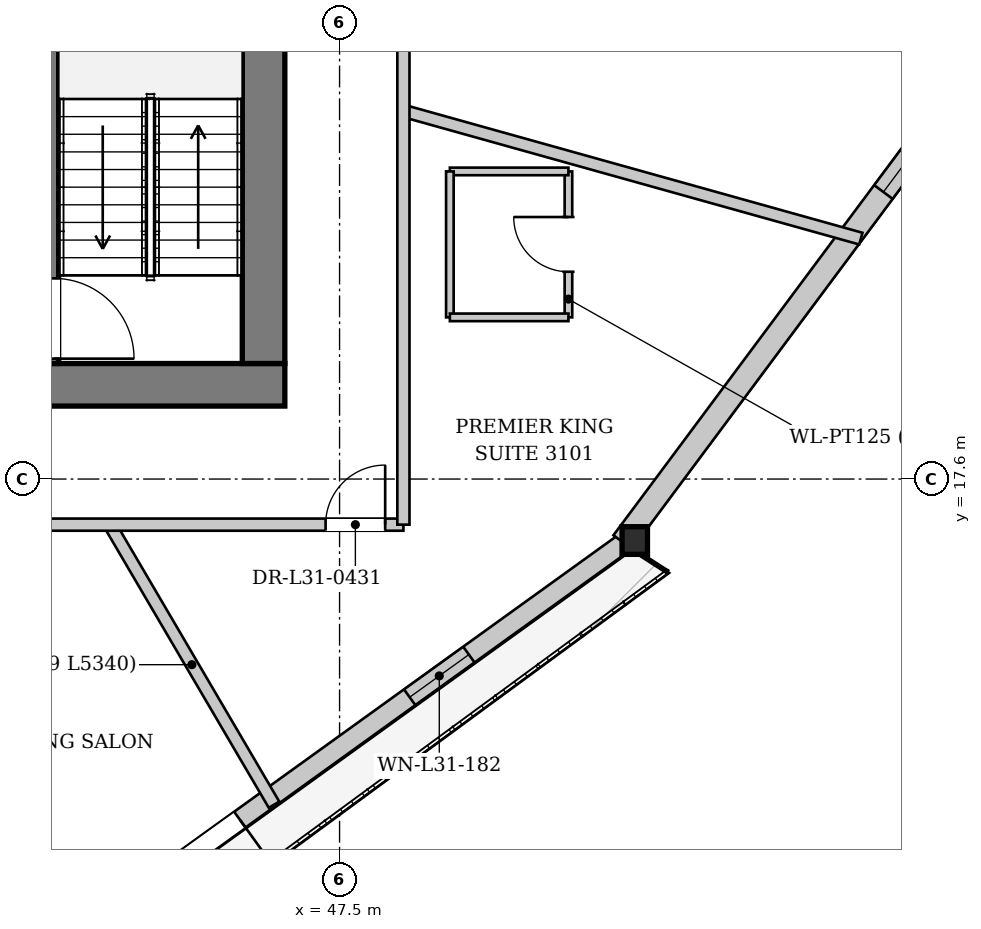
"""IFC4 building model, lengths in metres.
Left out: names, types, materials, properties, quantities, classifications, styles, units other than length and angle.
Written with IfcOpenShell. Run it as: python <this file> out.ifc"""

import sys

from ifc_helpers import new_model, si_unit, direction, frame, frame_2d, origin, origin_2d, place, context, subcontext, project, spatial, rectangle, i_section, extrude, source, transform, mapped, element, fill, save


model = new_model("IFC4")
c1 = context("Model", 3, precision=1e-05, world=origin(), true_north=direction((0.0, 1.0)))
c2 = subcontext(c1, "Body", "Model", "MODEL_VIEW")
j1 = project(units=[si_unit("LENGTHUNIT", "METRE"), si_unit("PLANEANGLEUNIT", "RADIAN")], contexts=[c1])
p1 = place(None, origin())
s1 = spatial("IfcSite", under=j1, at=p1, CompositionType="ELEMENT")
p2 = place(p1, origin())
s2 = spatial("IfcBuilding", under=s1, at=p2, CompositionType="ELEMENT")
p3 = place(p2, frame((0.0, 0.0, 119.9)))
s3 = spatial("IfcBuildingStorey", under=s2, at=p3, CompositionType="ELEMENT", Elevation=119.9)
m1 = source(origin(), c2, "Body", "SweptSolid", [
    extrude(i_section(OverallWidth=0.418, OverallDepth=0.455, WebThickness=0.038, FlangeThickness=0.059, at=origin_2d()), origin(), (0.0, 0.0, 1.0), 3.398),
])
p4 = place(p3, frame((52.309, 16.449, 0.0), z_axis=(0.026872697938, 0.082486249285, 0.996229831306), x_axis=(-0.950814714798, 0.309760194542, 0.0)))
e1 = element("IfcColumn", 1, at=p4, inside=s3, PredefinedType="COLUMN", context=c2, shape_type="MappedRepresentation", body=[
    mapped(m1, transform((0.0, 0.0, 0.0), x_axis=(1.0, 0.0, 0.0), y_axis=(0.0, 1.0, 0.0), z_axis=(0.0, 0.0, 1.0), scale=1.0)),
])
p5 = place(p3, frame((52.216, 16.579, 0.0), z_axis=(0.0, 0.0, 1.0), x_axis=(-0.811343672804, -0.584569452334, 0.0)))
e2 = element("IfcWall", 2, at=p5, inside=s3, PredefinedType="SOLIDWALL", context=c2, shape_type="SweptSolid", body=[
    extrude(rectangle(XDim=23.855, YDim=0.32, at=frame_2d((11.927, 0.0))), origin(), (0.0, 0.0, 1.0), 2.692),
])
p6 = place(p5, frame((7.834, 0.0, 0.0)))
e3 = element("IfcOpeningElement", 3, at=p6, cuts=e2, PredefinedType="OPENING", context=c2, shape_type="SweptSolid", body=[
    extrude(rectangle(XDim=1.1, YDim=2.3, at=frame_2d((0.55, 1.15))), frame((0.0, 0.17, 0.0), z_axis=(0.0, -1.0, 0.0), x_axis=(1.0, 0.0, 0.0)), (0.0, 0.0, 1.0), 0.34),
])
p7 = place(p5, frame((16.753, 0.0, 0.372)))
e4 = element("IfcOpeningElement", 4, at=p7, cuts=e2, PredefinedType="OPENING", context=c2, shape_type="SweptSolid", body=[
    extrude(rectangle(XDim=1.8, YDim=2.2, at=frame_2d((0.9, 1.1))), frame((0.0, 0.17, 0.0), z_axis=(0.0, -1.0, 0.0), x_axis=(1.0, 0.0, 0.0)), (0.0, 0.0, 1.0), 0.34),
])
p8 = place(p5, frame((3.191, 0.0, 0.65)))
e5 = element("IfcOpeningElement", 5, at=p8, cuts=e2, PredefinedType="OPENING", context=c2, shape_type="SweptSolid", body=[
    extrude(rectangle(XDim=1.2, YDim=1.5, at=frame_2d((0.6, 0.75))), frame((0.0, 0.17, 0.0), z_axis=(0.0, -1.0, 0.0), x_axis=(1.0, 0.0, 0.0)), (0.0, 0.0, 1.0), 0.34),
])
p9 = place(p3, frame((66.404, 35.695, 0.0), z_axis=(0.0, 0.0, 1.0), x_axis=(-0.59725858194, -0.802048743094, 0.0)))
e6 = element("IfcWall", 6, at=p9, inside=s3, PredefinedType="SOLIDWALL", context=c2, shape_type="SweptSolid", body=[
    extrude(rectangle(XDim=23.855, YDim=0.38, at=frame_2d((11.927, 0.0))), origin(), (0.0, 0.0, 1.0), 2.692),
])
p10 = place(p9, frame((5.579, 0.0, 0.322)))
e7 = element("IfcOpeningElement", 7, at=p10, cuts=e6, PredefinedType="OPENING", context=c2, shape_type="SweptSolid", body=[
    extrude(rectangle(XDim=2.2, YDim=2.25, at=frame_2d((1.1, 1.125))), frame((0.0, 0.2, 0.0), z_axis=(0.0, -1.0, 0.0), x_axis=(1.0, 0.0, 0.0)), (0.0, 0.0, 1.0), 0.4),
])
p11 = place(p9, frame((14.476, 0.0, 0.322)))
e8 = element("IfcOpeningElement", 8, at=p11, cuts=e6, PredefinedType="OPENING", context=c2, shape_type="SweptSolid", body=[
    extrude(rectangle(XDim=2.2, YDim=2.25, at=frame_2d((1.1, 1.125))), frame((0.0, 0.2, 0.0), z_axis=(0.0, -1.0, 0.0), x_axis=(1.0, 0.0, 0.0)), (0.0, 0.0, 1.0), 0.4),
])
p12 = place(p3, frame((46.6, 19.15, 0.0), z_axis=(0.0, 0.0, 1.0), x_axis=(-1.0, 0.0, 0.0)))
e9 = element("IfcWall", 9, at=p12, inside=s3, PredefinedType="SHEAR", context=c2, shape_type="SweptSolid", body=[
    extrude(rectangle(XDim=17.2, YDim=0.7, at=frame_2d((8.6, 0.0))), origin(), (0.0, 0.0, 1.0), 3.3),
])
p13 = place(p12, frame((4.8, 0.0, 0.0)))
e10 = element("IfcOpeningElement", 10, at=p13, cuts=e9, PredefinedType="OPENING", context=c2, shape_type="SweptSolid", body=[
    extrude(rectangle(XDim=1.12, YDim=2.25, at=frame_2d((0.56, 1.125))), frame((0.0, 0.36, 0.0), z_axis=(0.0, -1.0, 0.0), x_axis=(1.0, 0.0, 0.0)), (0.0, 0.0, 1.0), 0.72),
])
p14 = place(p12, frame((11.3, 0.0, 0.0)))
e11 = element("IfcOpeningElement", 11, at=p14, cuts=e9, PredefinedType="OPENING", context=c2, shape_type="SweptSolid", body=[
    extrude(rectangle(XDim=1.12, YDim=2.25, at=frame_2d((0.56, 1.125))), frame((0.0, 0.36, 0.0), z_axis=(0.0, -1.0, 0.0), x_axis=(1.0, 0.0, 0.0)), (0.0, 0.0, 1.0), 0.72),
])
p15 = place(p3, frame((46.25, 33.7, 0.0), z_axis=(0.0, 0.0, 1.0), x_axis=(0.0, -1.0, 0.0)))
e12 = element("IfcWall", 12, at=p15, inside=s3, PredefinedType="SHEAR", context=c2, shape_type="SweptSolid", body=[
    extrude(rectangle(XDim=14.2, YDim=0.7, at=frame_2d((7.1, 0.0))), origin(), (0.0, 0.0, 1.0), 3.3),
])
p16 = place(p15, frame((5.18, 0.0, 0.0)))
e13 = element("IfcOpeningElement", 13, at=p16, cuts=e12, PredefinedType="OPENING", context=c2, shape_type="SweptSolid", body=[
    extrude(rectangle(XDim=1.6, YDim=2.2, at=frame_2d((0.8, 1.1))), frame((0.0, 0.36, 0.0), z_axis=(0.0, -1.0, 0.0), x_axis=(1.0, 0.0, 0.0)), (0.0, 0.0, 1.0), 0.72),
])
p17 = place(p3, frame((42.8, 26.96, 0.0), z_axis=(0.0, 0.0, 1.0), x_axis=(0.0, -1.0, 0.0)))
e14 = element("IfcWall", 14, at=p17, inside=s3, PredefinedType="PARTITIONING", context=c2, shape_type="SweptSolid", body=[
    extrude(rectangle(XDim=7.46, YDim=0.16, at=frame_2d((3.73, 0.0))), origin(), (0.0, 0.0, 1.0), 3.3),
])
p18 = place(p17, frame((6.06, 0.0, 0.0)))
e15 = element("IfcOpeningElement", 15, at=p18, cuts=e14, PredefinedType="OPENING", context=c2, shape_type="SweptSolid", body=[
    extrude(rectangle(XDim=1.32, YDim=2.2, at=frame_2d((0.66, 1.1))), frame((0.0, 0.09, 0.0), z_axis=(0.0, -1.0, 0.0), x_axis=(1.0, 0.0, 0.0)), (0.0, 0.0, 1.0), 0.18),
])
p19 = place(p3, frame((43.72, 16.85, 0.0), z_axis=(0.0, 0.0, 1.0), x_axis=(0.506032751864, -0.862514263094, 0.0)))
e16 = element("IfcWall", 16, at=p19, inside=s3, PredefinedType="PARTITIONING", context=c2, shape_type="SweptSolid", body=[
    extrude(rectangle(XDim=5.34, YDim=0.2, at=frame_2d((2.67, 0.0))), origin(), (0.0, 0.0, 1.0), 3.3),
])
p20 = place(p3, frame((48.55, 23.654, 0.0), z_axis=(0.0, 0.0, 1.0), x_axis=(0.963168254659, -0.268899448153, 0.0)))
e17 = element("IfcWall", 17, at=p20, inside=s3, PredefinedType="PARTITIONING", context=c2, shape_type="SweptSolid", body=[
    extrude(rectangle(XDim=7.811, YDim=0.2, at=frame_2d((3.905, 0.0))), origin(), (0.0, 0.0, 1.0), 3.3),
])
p21 = place(p3, frame((51.264, 20.259, 0.0), z_axis=(0.0, 0.0, 1.0), x_axis=(0.0, 1.0, 0.0)))
e18 = element("IfcWall", 18, at=p21, inside=s3, PredefinedType="PARTITIONING", context=c2, shape_type="SweptSolid", body=[
    extrude(rectangle(XDim=2.4, YDim=0.125, at=frame_2d((1.2, 0.0))), origin(), (0.0, 0.0, 1.0), 3.3),
])
p22 = place(p21, frame((0.75, 0.0, 0.0)))
e19 = element("IfcOpeningElement", 19, at=p22, cuts=e18, PredefinedType="OPENING", context=c2, shape_type="SweptSolid", body=[
    extrude(rectangle(XDim=0.9, YDim=2.1, at=frame_2d((0.45, 1.05))), frame((0.0, 0.073, 0.0), z_axis=(0.0, -1.0, 0.0), x_axis=(1.0, 0.0, 0.0)), (0.0, 0.0, 1.0), 0.145),
])
p23 = place(p3, frame((51.264, 22.659, 0.0), z_axis=(0.0, 0.0, 1.0), x_axis=(-1.0, 0.0, 0.0)))
e20 = element("IfcWall", 20, at=p23, inside=s3, PredefinedType="PARTITIONING", context=c2, shape_type="SweptSolid", body=[
    extrude(rectangle(XDim=1.95, YDim=0.125, at=frame_2d((0.975, 0.0))), origin(), (0.0, 0.0, 1.0), 3.3),
])
p24 = place(p3, frame((49.314, 22.659, 0.0), z_axis=(0.0, 0.0, 1.0), x_axis=(0.0, -1.0, 0.0)))
e21 = element("IfcWall", 21, at=p24, inside=s3, PredefinedType="PARTITIONING", context=c2, shape_type="SweptSolid", body=[
    extrude(rectangle(XDim=2.4, YDim=0.125, at=frame_2d((1.2, 0.0))), origin(), (0.0, 0.0, 1.0), 3.3),
])
p25 = place(p3, frame((49.314, 20.259, 0.0), z_axis=(0.0, 0.0, 1.0), x_axis=(1.0, 0.0, 0.0)))
e22 = element("IfcWall", 22, at=p25, inside=s3, PredefinedType="PARTITIONING", context=c2, shape_type="SweptSolid", body=[
    extrude(rectangle(XDim=1.95, YDim=0.125, at=frame_2d((0.975, 0.0))), origin(), (0.0, 0.0, 1.0), 3.3),
])
p26 = place(p3, frame((27.45, 16.85, 0.0), z_axis=(0.0, 0.0, 1.0), x_axis=(1.0, 0.0, 0.0)))
e23 = element("IfcWall", 23, at=p26, inside=s3, PredefinedType="PARTITIONING", context=c2, shape_type="SweptSolid", body=[
    extrude(rectangle(XDim=21.1, YDim=0.2, at=frame_2d((10.55, 0.0))), origin(), (0.0, 0.0, 1.0), 2.925),
])
p27 = place(p26, frame((19.82, 0.0, 0.0)))
e24 = element("IfcOpeningElement", 24, at=p27, cuts=e23, PredefinedType="OPENING", context=c2, shape_type="SweptSolid", body=[
    extrude(rectangle(XDim=0.98, YDim=2.15, at=frame_2d((0.49, 1.075))), frame((0.0, 0.11, 0.0), z_axis=(0.0, -1.0, 0.0), x_axis=(1.0, 0.0, 0.0)), (0.0, 0.0, 1.0), 0.22),
])
p28 = place(p26, frame((2.278, 0.0, 0.0)))
e25 = element("IfcOpeningElement", 25, at=p28, cuts=e23, PredefinedType="OPENING", context=c2, shape_type="SweptSolid", body=[
    extrude(rectangle(XDim=0.98, YDim=2.15, at=frame_2d((0.49, 1.075))), frame((0.0, 0.11, 0.0), z_axis=(0.0, -1.0, 0.0), x_axis=(1.0, 0.0, 0.0)), (0.0, 0.0, 1.0), 0.22),
])
p29 = place(p26, frame((13.469, 0.0, 0.0)))
e26 = element("IfcOpeningElement", 26, at=p29, cuts=e23, PredefinedType="OPENING", context=c2, shape_type="SweptSolid", body=[
    extrude(rectangle(XDim=0.98, YDim=2.15, at=frame_2d((0.49, 1.075))), frame((0.0, 0.11, 0.0), z_axis=(0.0, -1.0, 0.0), x_axis=(1.0, 0.0, 0.0)), (0.0, 0.0, 1.0), 0.22),
])
p30 = place(p3, frame((48.55, 16.85, 0.0), z_axis=(0.0, 0.0, 1.0), x_axis=(0.0, 1.0, 0.0)))
e27 = element("IfcWall", 27, at=p30, inside=s3, PredefinedType="PARTITIONING", context=c2, shape_type="SweptSolid", body=[
    extrude(rectangle(XDim=19.5, YDim=0.2, at=frame_2d((9.75, 0.0))), origin(), (0.0, 0.0, 1.0), 3.3),
])
p31 = place(p30, frame((10.652, 0.0, 0.0)))
e28 = element("IfcOpeningElement", 28, at=p31, cuts=e27, PredefinedType="OPENING", context=c2, shape_type="SweptSolid", body=[
    extrude(rectangle(XDim=0.98, YDim=2.15, at=frame_2d((0.49, 1.075))), frame((0.0, 0.11, 0.0), z_axis=(0.0, -1.0, 0.0), x_axis=(1.0, 0.0, 0.0)), (0.0, 0.0, 1.0), 0.22),
])
m2 = source(origin(), c2, "Body", "SweptSolid", [
    extrude(rectangle(XDim=1.1, YDim=2.3, at=frame_2d((0.55, 1.15))), frame((0.0, 0.025, 0.0), z_axis=(0.0, -1.0, 0.0), x_axis=(1.0, 0.0, 0.0)), (0.0, 0.0, 1.0), 0.05),
])
p32 = place(p6, origin())
e29 = element("IfcDoor", 29, at=p32, inside=s3, OperationType="SINGLE_SWING_LEFT", PredefinedType="DOOR", context=c2, shape_type="MappedRepresentation", body=[
    mapped(m2, transform((0.0, 0.0, 0.0), x_axis=(1.0, 0.0, 0.0), y_axis=(0.0, 1.0, 0.0), z_axis=(0.0, 0.0, 1.0), scale=1.0)),
])
fill(e3, e29)
m3 = source(origin(), c2, "Body", "SweptSolid", [
    extrude(rectangle(XDim=2.2, YDim=2.25, at=frame_2d((1.1, 1.125))), frame((0.0, 0.03, 0.0), z_axis=(0.0, -1.0, 0.0), x_axis=(1.0, 0.0, 0.0)), (0.0, 0.0, 1.0), 0.06),
])
p33 = place(p11, origin())
e30 = element("IfcWindow", 30, at=p33, inside=s3, PartitioningType="SINGLE_PANEL", PredefinedType="WINDOW", context=c2, shape_type="MappedRepresentation", body=[
    mapped(m3, transform((0.0, 0.0, 0.0), x_axis=(1.0, 0.0, 0.0), y_axis=(0.0, 1.0, 0.0), z_axis=(0.0, 0.0, 1.0), scale=1.0)),
])
fill(e8, e30)
m4 = source(origin(), c2, "Body", "SweptSolid", [
    extrude(rectangle(XDim=1.2, YDim=1.5, at=frame_2d((0.6, 0.75))), frame((0.0, 0.03, 0.0), z_axis=(0.0, -1.0, 0.0), x_axis=(1.0, 0.0, 0.0)), (0.0, 0.0, 1.0), 0.06),
])
p34 = place(p8, origin())
e31 = element("IfcWindow", 31, at=p34, inside=s3, PartitioningType="SINGLE_PANEL", PredefinedType="WINDOW", context=c2, shape_type="MappedRepresentation", body=[
    mapped(m4, transform((0.0, 0.0, 0.0), x_axis=(1.0, 0.0, 0.0), y_axis=(0.0, 1.0, 0.0), z_axis=(0.0, 0.0, 1.0), scale=1.0)),
])
fill(e5, e31)
m5 = source(origin(), c2, "Body", "SweptSolid", [
    extrude(rectangle(XDim=1.32, YDim=2.2, at=frame_2d((0.66, 1.1))), frame((0.0, 0.025, 0.0), z_axis=(0.0, -1.0, 0.0), x_axis=(1.0, 0.0, 0.0)), (0.0, 0.0, 1.0), 0.05),
])
p35 = place(p18, origin())
e32 = element("IfcDoor", 32, at=p35, inside=s3, OperationType="SINGLE_SWING_RIGHT", PredefinedType="DOOR", context=c2, shape_type="MappedRepresentation", body=[
    mapped(m5, transform((0.0, 0.0, 0.0), x_axis=(1.0, 0.0, 0.0), y_axis=(0.0, 1.0, 0.0), z_axis=(0.0, 0.0, 1.0), scale=1.0)),
])
fill(e15, e32)
m6 = source(origin(), c2, "Body", "SweptSolid", [
    extrude(rectangle(XDim=0.9, YDim=2.1, at=frame_2d((0.45, 1.05))), frame((0.0, 0.025, 0.0), z_axis=(0.0, -1.0, 0.0), x_axis=(1.0, 0.0, 0.0)), (0.0, 0.0, 1.0), 0.05),
])
p36 = place(p22, origin())
e33 = element("IfcDoor", 33, at=p36, inside=s3, OperationType="SINGLE_SWING_RIGHT", PredefinedType="DOOR", context=c2, shape_type="MappedRepresentation", body=[
    mapped(m6, transform((0.0, 0.0, 0.0), x_axis=(1.0, 0.0, 0.0), y_axis=(0.0, 1.0, 0.0), z_axis=(0.0, 0.0, 1.0), scale=1.0)),
])
fill(e19, e33)
m7 = source(origin(), c2, "Body", "SweptSolid", [
    extrude(rectangle(XDim=0.98, YDim=2.15, at=frame_2d((0.49, 1.075))), frame((0.0, 0.025, 0.0), z_axis=(0.0, -1.0, 0.0), x_axis=(1.0, 0.0, 0.0)), (0.0, 0.0, 1.0), 0.05),
])
p37 = place(p27, origin())
e34 = element("IfcDoor", 34, at=p37, inside=s3, OperationType="SINGLE_SWING_RIGHT", PredefinedType="DOOR", context=c2, shape_type="MappedRepresentation", body=[
    mapped(m7, transform((0.0, 0.0, 0.0), x_axis=(1.0, 0.0, 0.0), y_axis=(0.0, 1.0, 0.0), z_axis=(0.0, 0.0, 1.0), scale=1.0)),
])
fill(e24, e34)
save(model, sys.argv[1])
